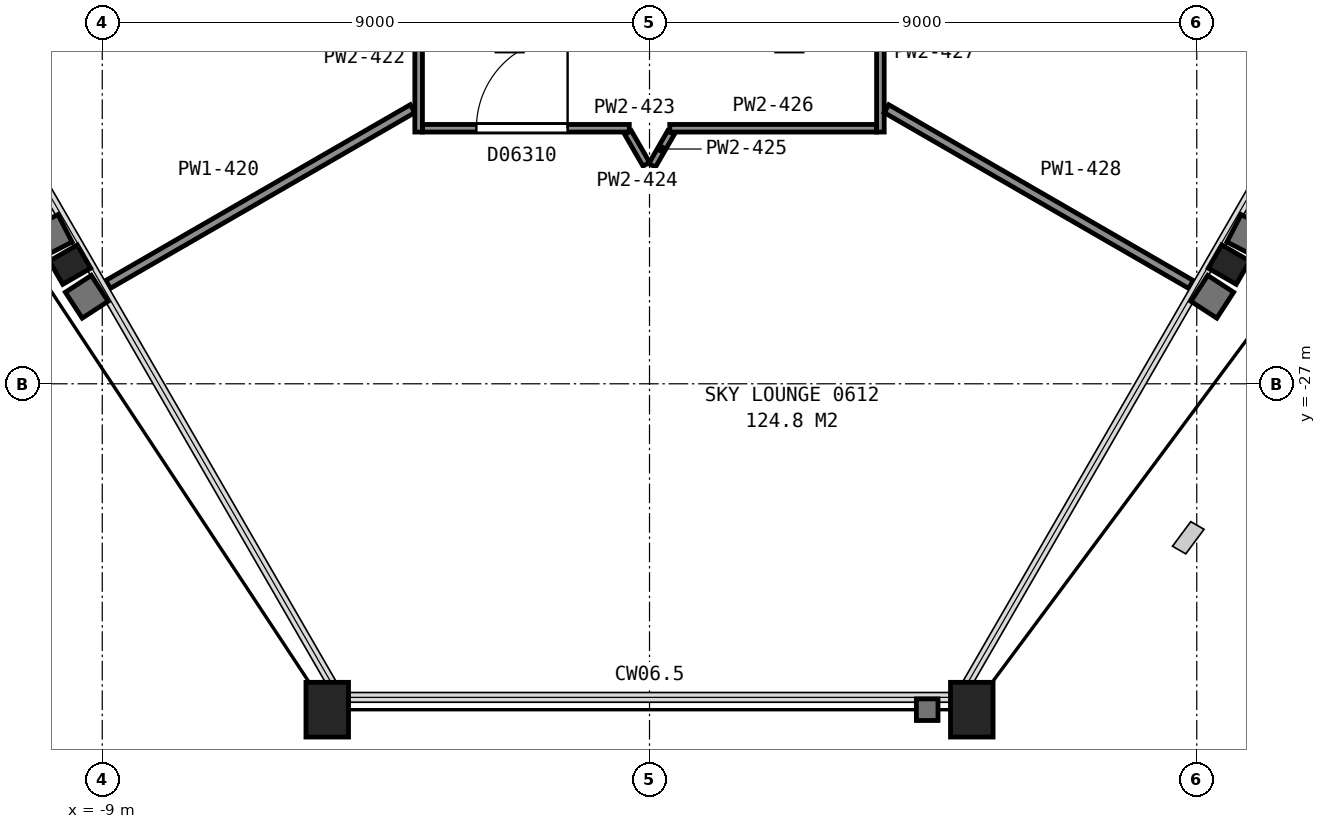
"""IFC4 building model, lengths in metres.
Left out: names, types, materials, properties, quantities, classifications, styles, units other than length and angle.
Written with IfcOpenShell. Run it as: python <this file> out.ifc"""

import sys

from ifc_helpers import new_model, si_unit, direction, frame, frame_2d, origin, origin_2d, place, context, subcontext, project, spatial, rectangle, hollow_rectangle, i_section, extrude, element, fill, save


model = new_model("IFC4")
c1 = context("Model", 3, precision=1e-05, world=origin(), true_north=direction((0.0, 1.0)))
c2 = subcontext(c1, "Body", "Model", "MODEL_VIEW")
j1 = project(units=[si_unit("LENGTHUNIT", "METRE"), si_unit("PLANEANGLEUNIT", "RADIAN")], contexts=[c1])
p1 = place(None, origin())
s1 = spatial("IfcSite", under=j1, at=p1, CompositionType="ELEMENT")
p2 = place(p1, origin())
s2 = spatial("IfcBuilding", under=s1, at=p2, CompositionType="ELEMENT")
p3 = place(p2, frame((0.0, 0.0, 36.8)))
s3 = spatial("IfcBuildingStorey", under=s2, at=p3, CompositionType="ELEMENT", Elevation=36.8)
p4 = place(p3, frame((-9.53, -25.04, 0.03), z_axis=(0.0, 0.0, 1.0), x_axis=(-0.5, 0.866025403784, 0.0)))
e1 = element("IfcColumn", 1, at=p4, inside=s3, PredefinedType="COLUMN", context=c2, shape_type="SweptSolid", body=[
    extrude(i_section(OverallWidth=0.442, OverallDepth=0.531, WebThickness=0.066, FlangeThickness=0.106, FilletRadius=0.015, at=origin_2d()), origin(), (0.0, 0.0, 1.0), 3.57),
])
for number, where, z_axis, x_axis in (
    (2, (-5.3, -32.36, 0.045), (0.0, 0.0, 1.0), (-1.0, 0.0, 0.0)),
    (3, (5.3, -32.36, 0.045), (0.0, 0.0, 1.0), (-1.0, 0.0, 0.0)),
):
    element("IfcColumn", number, at=place(p3, frame(where, z_axis=z_axis, x_axis=x_axis)), inside=s3, PredefinedType="COLUMN", context=c2, shape_type="SweptSolid", body=[
        extrude(hollow_rectangle(XDim=0.7, YDim=0.9, WallThickness=0.065, at=origin_2d()), origin(), (0.0, 0.0, 1.0), 3.555),
    ])
p5 = place(p3, frame((9.53, -25.04, 0.03), z_axis=(0.0, 0.0, 1.0), x_axis=(-0.5, -0.866025403784, 0.0)))
e4 = element("IfcColumn", 4, at=p5, inside=s3, PredefinedType="COLUMN", context=c2, shape_type="SweptSolid", body=[
    extrude(i_section(OverallWidth=0.442, OverallDepth=0.531, WebThickness=0.066, FlangeThickness=0.106, FilletRadius=0.015, at=origin_2d()), origin(), (0.0, 0.0, 1.0), 3.57),
])
p6 = place(p3, frame((-8.905, -25.366, 0.0), z_axis=(0.0, 0.0, 1.0), x_axis=(0.866025977343, 0.499999006567, 0.0)))
e5 = element("IfcWall", 5, at=p6, inside=s3, PredefinedType="PARTITIONING", context=c2, shape_type="SweptSolid", body=[
    extrude(rectangle(XDim=5.782, YDim=0.15, at=frame_2d((2.891, 0.0))), origin(), (0.0, 0.0, 1.0), 2.613),
])
p7 = place(p3, frame((-3.797, -22.86, 0.0), z_axis=(0.0, 0.0, 1.0), x_axis=(0.0, 1.0, 0.0)))
e6 = element("IfcWall", 6, at=p7, inside=s3, PredefinedType="PARTITIONING", context=c2, shape_type="SweptSolid", body=[
    extrude(rectangle(XDim=5.871, YDim=0.125, at=frame_2d((2.935, 0.0))), origin(), (0.0, 0.0, 1.0), 2.613),
])
p8 = place(p7, frame((2.442, 0.0, 0.0)))
e7 = element("IfcOpeningElement", 7, at=p8, cuts=e6, PredefinedType="OPENING", context=c2, shape_type="SweptSolid", body=[
    extrude(rectangle(XDim=1.5, YDim=2.1, at=frame_2d((0.75, 1.05))), frame((0.0, 0.073, 0.0), z_axis=(0.0, -1.0, 0.0), x_axis=(1.0, 0.0, 0.0)), (0.0, 0.0, 1.0), 0.145),
])
p9 = place(p3, frame((-0.333, -22.797, 0.0), z_axis=(0.0, 0.0, 1.0), x_axis=(-1.0, 0.0, 0.0)))
e8 = element("IfcWall", 8, at=p9, inside=s3, PredefinedType="PARTITIONING", context=c2, shape_type="SweptSolid", body=[
    extrude(rectangle(XDim=3.399, YDim=0.125, at=frame_2d((1.7, 0.0))), origin(), (0.0, 0.0, 1.0), 2.613),
])
p10 = place(p9, frame((1.014, 0.0, 0.0)))
e9 = element("IfcOpeningElement", 9, at=p10, cuts=e8, PredefinedType="OPENING", context=c2, shape_type="SweptSolid", body=[
    extrude(rectangle(XDim=1.5, YDim=2.1, at=frame_2d((0.75, 1.05))), frame((0.0, 0.073, 0.0), z_axis=(0.0, -1.0, 0.0), x_axis=(1.0, 0.0, 0.0)), (0.0, 0.0, 1.0), 0.145),
])
p11 = place(p3, frame((-0.353, -22.871, 0.0), z_axis=(0.0, 0.0, 1.0), x_axis=(0.499863517517, -0.866104187645, 0.0)))
e10 = element("IfcWall", 10, at=p11, inside=s3, PredefinedType="PARTITIONING", context=c2, shape_type="SweptSolid", body=[
    extrude(rectangle(XDim=0.599, YDim=0.125, at=frame_2d((0.3, 0.0))), origin(), (0.0, 0.0, 1.0), 2.613),
])
p12 = place(p3, frame((0.043, -23.407, 0.0), z_axis=(0.0, 0.0, 1.0), x_axis=(0.499870333213, 0.866100253997, 0.0)))
e11 = element("IfcWall", 11, at=p12, inside=s3, PredefinedType="PARTITIONING", context=c2, shape_type="SweptSolid", body=[
    extrude(rectangle(XDim=0.619, YDim=0.125, at=frame_2d((0.31, 0.0))), origin(), (0.0, 0.0, 1.0), 2.613),
])
p13 = place(p3, frame((0.333, -22.797, 0.0), z_axis=(0.0, 0.0, 1.0), x_axis=(1.0, 0.0, 0.0)))
e12 = element("IfcWall", 12, at=p13, inside=s3, PredefinedType="PARTITIONING", context=c2, shape_type="SweptSolid", body=[
    extrude(rectangle(XDim=3.399, YDim=0.125, at=frame_2d((1.7, 0.0))), origin(), (0.0, 0.0, 1.0), 2.613),
])
p14 = place(p3, frame((3.797, -16.989, 0.0), z_axis=(0.0, 0.0, 1.0), x_axis=(0.0, -1.0, 0.0)))
e13 = element("IfcWall", 13, at=p14, inside=s3, PredefinedType="PARTITIONING", context=c2, shape_type="SweptSolid", body=[
    extrude(rectangle(XDim=5.871, YDim=0.125, at=frame_2d((2.935, 0.0))), origin(), (0.0, 0.0, 1.0), 2.613),
])
p15 = place(p14, frame((2.078, 0.0, 0.0)))
e14 = element("IfcOpeningElement", 14, at=p15, cuts=e13, PredefinedType="OPENING", context=c2, shape_type="SweptSolid", body=[
    extrude(rectangle(XDim=1.2, YDim=2.1, at=frame_2d((0.6, 1.05))), frame((0.0, 0.073, 0.0), z_axis=(0.0, -1.0, 0.0), x_axis=(1.0, 0.0, 0.0)), (0.0, 0.0, 1.0), 0.145),
])
p16 = place(p3, frame((3.897, -22.475, 0.0), z_axis=(0.0, 0.0, 1.0), x_axis=(0.866025977343, -0.499999006567, 0.0)))
e15 = element("IfcWall", 15, at=p16, inside=s3, PredefinedType="PARTITIONING", context=c2, shape_type="SweptSolid", body=[
    extrude(rectangle(XDim=5.782, YDim=0.15, at=frame_2d((2.891, 0.0))), origin(), (0.0, 0.0, 1.0), 2.613),
])
p17 = place(p10, origin())
e16 = element("IfcDoor", 16, at=p17, inside=s3, OperationType="DOUBLE_DOOR_SINGLE_SWING", PredefinedType="DOOR", context=c2, shape_type="SweptSolid", body=[
    extrude(rectangle(XDim=1.5, YDim=2.1, at=frame_2d((0.75, 1.05))), frame((0.0, 0.025, 0.0), z_axis=(0.0, -1.0, 0.0), x_axis=(1.0, 0.0, 0.0)), (0.0, 0.0, 1.0), 0.05),
])
fill(e9, e16)
save(model, sys.argv[1])
